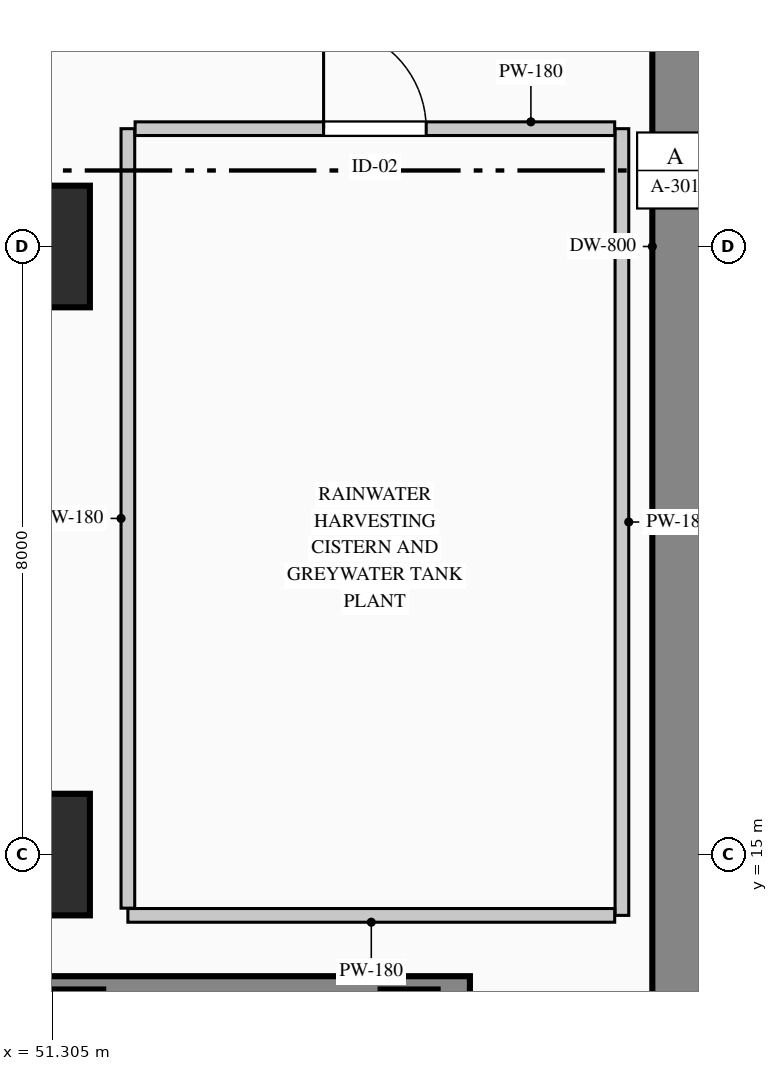
"""IFC4 building model, lengths in metres.
Left out: names, types, materials, properties, quantities, classifications, styles, units other than length and angle.
Written with IfcOpenShell. Run it as: python <this file> out.ifc"""

import sys

from ifc_helpers import new_model, si_unit, direction, frame, frame_2d, origin, origin_2d, place, context, subcontext, project, spatial, rectangle, extrude, element, fill, save


model = new_model("IFC4")
c1 = context("Model", 3, precision=1e-05, world=origin(), true_north=direction((0.0, 1.0)))
c2 = subcontext(c1, "Body", "Model", "MODEL_VIEW")
j1 = project(units=[si_unit("LENGTHUNIT", "METRE"), si_unit("PLANEANGLEUNIT", "RADIAN")], contexts=[c1])
p1 = place(None, origin())
s1 = spatial("IfcSite", under=j1, at=p1, CompositionType="ELEMENT")
p2 = place(p1, origin())
s2 = spatial("IfcBuilding", under=s1, at=p2, CompositionType="ELEMENT")
p3 = place(p2, frame((0.0, 0.0, -18.0)))
s3 = spatial("IfcBuildingStorey", under=s2, at=p3, CompositionType="ELEMENT", Elevation=-18.0)
p4 = place(p3, frame((59.6, 0.8, 0.0), z_axis=(0.0, 0.0, 1.0), x_axis=(0.0, 1.0, 0.0)))
e1 = element("IfcWall", 1, at=p4, inside=s3, PredefinedType="USERDEFINED", context=c2, shape_type="SweptSolid", body=[
    extrude(rectangle(XDim=44.4, YDim=0.8, at=frame_2d((22.2, 0.0))), origin(), (0.0, 0.0, 1.0), 4.5),
])
for number, where, z_axis, x_axis in (
    (2, (51.0, 15.0, 0.0), (0.0, 0.0, 1.0), (1.0, 0.0, 0.0)),
    (3, (51.0, 23.0, 0.0), (0.0, 0.0, 1.0), (1.0, 0.0, 0.0)),
):
    element("IfcColumn", number, at=place(p3, frame(where, z_axis=z_axis, x_axis=x_axis)), inside=s3, PredefinedType="COLUMN", context=c2, shape_type="SweptSolid", body=[
        extrude(rectangle(XDim=1.6, YDim=1.6, at=origin_2d()), origin(), (0.0, 0.0, 1.0), 4.5),
    ])
for number, where, z_axis, x_axis in (
    (4, (51.6, 12.85, 0.0), (0.0, 0.0, 1.0), (1.0, 0.0, 0.0)),
    (5, (56.0, 12.85, 0.0), (0.0, 0.0, 1.0), (1.0, 0.0, 0.0)),
):
    element("IfcColumn", number, at=place(p3, frame(where, z_axis=z_axis, x_axis=x_axis)), inside=s3, PredefinedType="COLUMN", context=c2, shape_type="SweptSolid", body=[
        extrude(rectangle(XDim=0.75, YDim=0.75, at=origin_2d()), origin(), (0.0, 0.0, 1.0), 4.2),
    ])
p5 = place(p3, frame((35.2, 13.25, 0.0), z_axis=(0.0, 0.0, 1.0), x_axis=(1.0, 0.0, 0.0)))
e6 = element("IfcWall", 6, at=p5, inside=s3, PredefinedType="SOLIDWALL", context=c2, shape_type="SweptSolid", body=[
    extrude(rectangle(XDim=21.6, YDim=0.3, at=frame_2d((10.8, 0.0))), origin(), (0.0, 0.0, 1.0), 4.5),
])
p6 = place(p3, frame((58.8, 24.55, 0.0), z_axis=(0.0, 0.0, 1.0), x_axis=(0.0, -1.0, 0.0)))
e7 = element("IfcWall", 7, at=p6, inside=s3, PredefinedType="PARTITIONING", context=c2, shape_type="SweptSolid", body=[
    extrude(rectangle(XDim=10.35, YDim=0.18, at=frame_2d((5.175, 0.0))), origin(), (0.0, 0.0, 1.0), 4.135),
])
p7 = place(p3, frame((58.705, 14.2, 0.0), z_axis=(0.0, 0.0, 1.0), x_axis=(-1.0, 0.0, 0.0)))
e8 = element("IfcWall", 8, at=p7, inside=s3, PredefinedType="PARTITIONING", context=c2, shape_type="SweptSolid", body=[
    extrude(rectangle(XDim=6.405, YDim=0.18, at=frame_2d((3.203, 0.0))), origin(), (0.0, 0.0, 1.0), 4.135),
])
p8 = place(p3, frame((52.3, 14.295, 0.0), z_axis=(0.0, 0.0, 1.0), x_axis=(0.0, 1.0, 0.0)))
e9 = element("IfcWall", 9, at=p8, inside=s3, PredefinedType="PARTITIONING", context=c2, shape_type="SweptSolid", body=[
    extrude(rectangle(XDim=10.255, YDim=0.18, at=frame_2d((5.127, 0.0))), origin(), (0.0, 0.0, 1.0), 4.135),
])
p9 = place(p3, frame((52.395, 24.55, 0.0), z_axis=(0.0, 0.0, 1.0), x_axis=(1.0, 0.0, 0.0)))
e10 = element("IfcWall", 10, at=p9, inside=s3, PredefinedType="PARTITIONING", context=c2, shape_type="SweptSolid", body=[
    extrude(rectangle(XDim=6.31, YDim=0.18, at=frame_2d((3.155, 0.0))), origin(), (0.0, 0.0, 1.0), 3.52),
])
p10 = place(p9, frame((2.48, 0.0, 0.0)))
e11 = element("IfcOpeningElement", 11, at=p10, cuts=e10, PredefinedType="OPENING", context=c2, shape_type="SweptSolid", body=[
    extrude(rectangle(XDim=1.35, YDim=2.2, at=frame_2d((0.675, 1.1))), frame((0.0, 0.1, 0.0), z_axis=(0.0, -1.0, 0.0), x_axis=(1.0, 0.0, 0.0)), (0.0, 0.0, 1.0), 0.2),
])
p11 = place(p10, origin())
e12 = element("IfcDoor", 12, at=p11, inside=s3, OperationType="SINGLE_SWING_LEFT", PredefinedType="DOOR", context=c2, shape_type="SweptSolid", body=[
    extrude(rectangle(XDim=1.35, YDim=2.2, at=frame_2d((0.675, 1.1))), frame((0.0, 0.025, 0.0), z_axis=(0.0, -1.0, 0.0), x_axis=(1.0, 0.0, 0.0)), (0.0, 0.0, 1.0), 0.05),
])
fill(e11, e12)
save(model, sys.argv[1])
